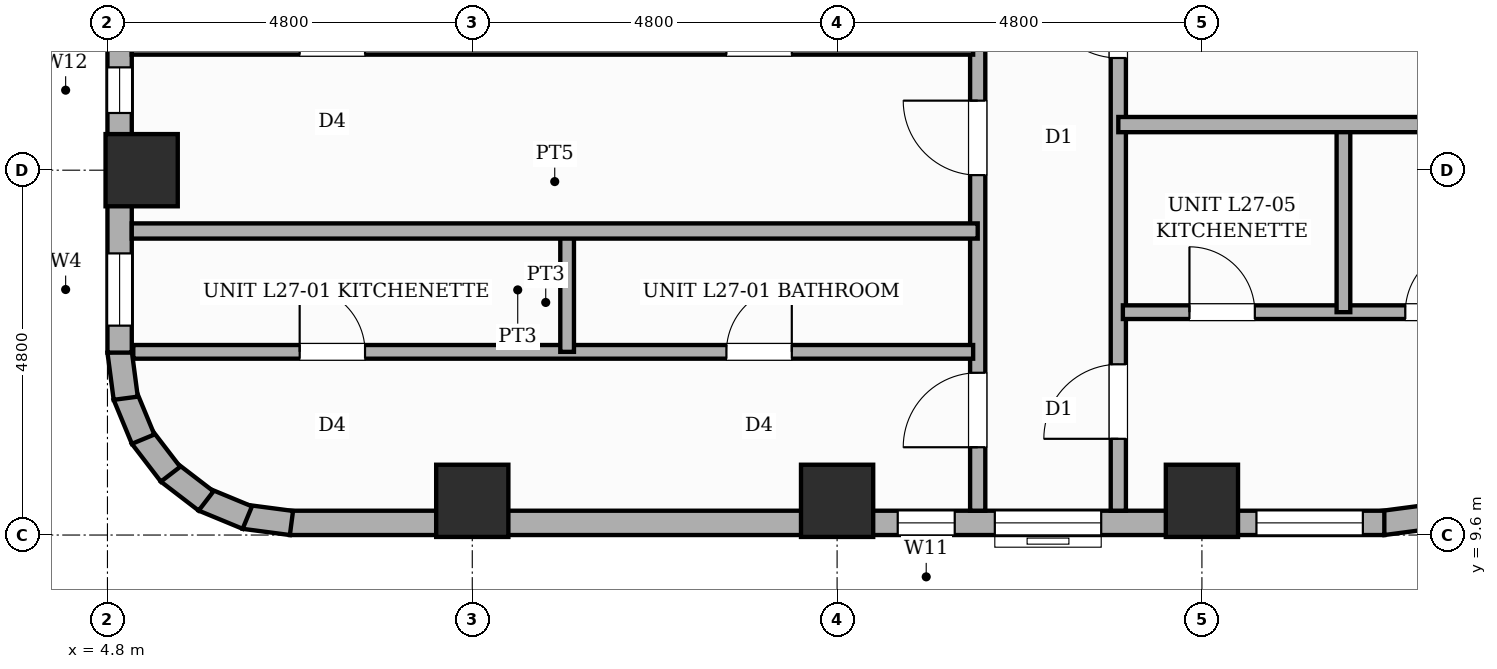
"""IFC4 building model, lengths in metres.
Left out: names, types, materials, properties, quantities, classifications, styles, units other than length and angle.
Written with IfcOpenShell. Run it as: python <this file> out.ifc"""

import sys

from ifc_helpers import new_model, si_unit, direction, frame, frame_2d, origin, origin_2d, place, context, subcontext, project, spatial, rectangle, extrude, element, fill, save


model = new_model("IFC4")
c1 = context("Model", 3, precision=1e-05, world=origin(), true_north=direction((0.0, 1.0)))
c2 = subcontext(c1, "Body", "Model", "MODEL_VIEW")
j1 = project(units=[si_unit("LENGTHUNIT", "METRE"), si_unit("PLANEANGLEUNIT", "RADIAN")], contexts=[c1])
p1 = place(None, origin())
s1 = spatial("IfcSite", under=j1, at=p1, CompositionType="ELEMENT")
p2 = place(p1, origin())
s2 = spatial("IfcBuilding", under=s1, at=p2, CompositionType="ELEMENT")
p3 = place(p2, frame((0.0, 0.0, 107.2)))
s3 = spatial("IfcBuildingStorey", under=s2, at=p3, CompositionType="ELEMENT", Elevation=107.2)
for number, where, z_axis, x_axis in (
    (1, (5.25, 14.4, 0.0), (0.0, 0.0, 1.0), (1.0, 0.0, 0.0)),
    (2, (9.6, 10.05, 0.0), (0.0, 0.0, 1.0), (1.0, 0.0, 0.0)),
    (3, (14.4, 10.05, 0.0), (0.0, 0.0, 1.0), (1.0, 0.0, 0.0)),
    (4, (19.2, 10.05, 0.0), (0.0, 0.0, 1.0), (1.0, 0.0, 0.0)),
):
    element("IfcColumn", number, at=place(p3, frame(where, z_axis=z_axis, x_axis=x_axis)), inside=s3, PredefinedType="COLUMN", context=c2, shape_type="SweptSolid", body=[
        extrude(rectangle(XDim=0.95, YDim=0.95, at=origin_2d()), origin(), (0.0, 0.0, 1.0), 3.6),
    ])
p4 = place(p3, frame((22.2, 9.84, 0.0), z_axis=(0.0, 0.0, 1.0), x_axis=(-0.9914410257, -0.130555323746, 0.0)))
e5 = element("IfcWall", 5, at=p4, inside=s3, PredefinedType="STANDARD", context=c2, shape_type="SweptSolid", body=[
    extrude(rectangle(XDim=0.626, YDim=0.32, at=frame_2d((0.313, 0.0))), origin(), (0.0, 0.0, 1.0), 3.36),
])
p5 = place(p3, frame((21.6, 9.76, 0.0), z_axis=(0.0, 0.0, 1.0), x_axis=(-1.0, 0.0, 0.0)))
e6 = element("IfcWall", 6, at=p5, inside=s3, PredefinedType="STANDARD", context=c2, shape_type="SweptSolid", body=[
    extrude(rectangle(XDim=14.4, YDim=0.32, at=frame_2d((7.2, 0.0))), origin(), (0.0, 0.0, 1.0), 2.54),
])
p6 = place(p5, frame((5.653, 0.0, 0.45)))
e7 = element("IfcOpeningElement", 7, at=p6, cuts=e6, PredefinedType="OPENING", context=c2, shape_type="SweptSolid", body=[
    extrude(rectangle(XDim=0.75, YDim=1.8, at=frame_2d((0.375, 0.9))), frame((0.0, 0.17, 0.0), z_axis=(0.0, -1.0, 0.0), x_axis=(1.0, 0.0, 0.0)), (0.0, 0.0, 1.0), 0.34),
])
p7 = place(p5, frame((0.282, 0.0, 0.65)))
e8 = element("IfcOpeningElement", 8, at=p7, cuts=e6, PredefinedType="OPENING", context=c2, shape_type="SweptSolid", body=[
    extrude(rectangle(XDim=1.4, YDim=1.1, at=frame_2d((0.7, 0.55))), frame((0.0, 0.17, 0.0), z_axis=(0.0, -1.0, 0.0), x_axis=(1.0, 0.0, 0.0)), (0.0, 0.0, 1.0), 0.34),
])
p8 = place(p5, frame((3.725, 0.0, 0.65)))
e9 = element("IfcOpeningElement", 9, at=p8, cuts=e6, PredefinedType="OPENING", context=c2, shape_type="SweptSolid", body=[
    extrude(rectangle(XDim=1.4, YDim=1.1, at=frame_2d((0.7, 0.55))), frame((0.0, 0.17, 0.0), z_axis=(0.0, -1.0, 0.0), x_axis=(1.0, 0.0, 0.0)), (0.0, 0.0, 1.0), 0.34),
])
p9 = place(p3, frame((7.221, 9.759, 0.0), z_axis=(0.0, 0.0, 1.0), x_axis=(-0.991447664465, 0.130504898859, 0.0)))
e10 = element("IfcWall", 10, at=p9, inside=s3, PredefinedType="STANDARD", context=c2, shape_type="SweptSolid", body=[
    extrude(rectangle(XDim=0.627, YDim=0.32, at=frame_2d((0.313, 0.0))), origin(), (0.0, 0.0, 1.0), 3.36),
])
p10 = place(p3, frame((6.64, 9.83, 0.0), z_axis=(0.0, 0.0, 1.0), x_axis=(-0.923836271867, 0.382787856107, 0.0)))
e11 = element("IfcWall", 11, at=p10, inside=s3, PredefinedType="STANDARD", context=c2, shape_type="SweptSolid", body=[
    extrude(rectangle(XDim=0.626, YDim=0.32, at=frame_2d((0.313, 0.0))), origin(), (0.0, 0.0, 1.0), 3.36),
])
p11 = place(p3, frame((6.097, 10.048, 0.0), z_axis=(0.0, 0.0, 1.0), x_axis=(-0.793405610854, 0.608693302629, 0.0)))
e12 = element("IfcWall", 12, at=p11, inside=s3, PredefinedType="STANDARD", context=c2, shape_type="SweptSolid", body=[
    extrude(rectangle(XDim=0.626, YDim=0.32, at=frame_2d((0.313, 0.0))), origin(), (0.0, 0.0, 1.0), 3.36),
])
p12 = place(p3, frame((5.63, 10.4, 0.0), z_axis=(0.0, 0.0, 1.0), x_axis=(-0.608938521285, 0.7932174212, 0.0)))
e13 = element("IfcWall", 13, at=p12, inside=s3, PredefinedType="STANDARD", context=c2, shape_type="SweptSolid", body=[
    extrude(rectangle(XDim=0.627, YDim=0.32, at=frame_2d((0.313, 0.0))), origin(), (0.0, 0.0, 1.0), 3.36),
])
p13 = place(p3, frame((5.269, 10.861, 0.0), z_axis=(0.0, 0.0, 1.0), x_axis=(-0.382650053678, 0.92389335771, 0.0)))
e14 = element("IfcWall", 14, at=p13, inside=s3, PredefinedType="STANDARD", context=c2, shape_type="SweptSolid", body=[
    extrude(rectangle(XDim=0.626, YDim=0.32, at=frame_2d((0.313, 0.0))), origin(), (0.0, 0.0, 1.0), 3.36),
])
p14 = place(p3, frame((5.04, 11.4, 0.0), z_axis=(0.0, 0.0, 1.0), x_axis=(-0.130504898859, 0.991447664465, 0.0)))
e15 = element("IfcWall", 15, at=p14, inside=s3, PredefinedType="STANDARD", context=c2, shape_type="SweptSolid", body=[
    extrude(rectangle(XDim=0.627, YDim=0.32, at=frame_2d((0.313, 0.0))), origin(), (0.0, 0.0, 1.0), 3.36),
])
p15 = place(p3, frame((4.96, 12.0, 0.0), z_axis=(0.0, 0.0, 1.0), x_axis=(0.0, 1.0, 0.0)))
e16 = element("IfcWall", 16, at=p15, inside=s3, PredefinedType="STANDARD", context=c2, shape_type="SweptSolid", body=[
    extrude(rectangle(XDim=33.6, YDim=0.32, at=frame_2d((16.8, 0.0))), origin(), (0.0, 0.0, 1.0), 2.54),
])
p16 = place(p15, frame((3.153, 0.0, 0.45)))
e17 = element("IfcOpeningElement", 17, at=p16, cuts=e16, PredefinedType="OPENING", context=c2, shape_type="SweptSolid", body=[
    extrude(rectangle(XDim=0.6, YDim=1.8, at=frame_2d((0.3, 0.9))), frame((0.0, 0.17, 0.0), z_axis=(0.0, -1.0, 0.0), x_axis=(1.0, 0.0, 0.0)), (0.0, 0.0, 1.0), 0.34),
])
p17 = place(p15, frame((5.853, 0.0, 0.45)))
e18 = element("IfcOpeningElement", 18, at=p17, cuts=e16, PredefinedType="OPENING", context=c2, shape_type="SweptSolid", body=[
    extrude(rectangle(XDim=0.6, YDim=1.8, at=frame_2d((0.3, 0.9))), frame((0.0, 0.17, 0.0), z_axis=(0.0, -1.0, 0.0), x_axis=(1.0, 0.0, 0.0)), (0.0, 0.0, 1.0), 0.34),
])
p18 = place(p15, frame((9.853, 0.0, 0.65)))
e19 = element("IfcOpeningElement", 19, at=p18, cuts=e16, PredefinedType="OPENING", context=c2, shape_type="SweptSolid", body=[
    extrude(rectangle(XDim=1.4, YDim=1.1, at=frame_2d((0.7, 0.55))), frame((0.0, 0.17, 0.0), z_axis=(0.0, -1.0, 0.0), x_axis=(1.0, 0.0, 0.0)), (0.0, 0.0, 1.0), 0.34),
])
p19 = place(p15, frame((0.355, 0.0, 0.45)))
e20 = element("IfcOpeningElement", 20, at=p19, cuts=e16, PredefinedType="OPENING", context=c2, shape_type="SweptSolid", body=[
    extrude(rectangle(XDim=0.95, YDim=1.8, at=frame_2d((0.475, 0.9))), frame((0.0, 0.17, 0.0), z_axis=(0.0, -1.0, 0.0), x_axis=(1.0, 0.0, 0.0)), (0.0, 0.0, 1.0), 0.34),
])
p20 = place(p15, frame((4.33, 0.0, 0.45)))
e21 = element("IfcOpeningElement", 21, at=p20, cuts=e16, PredefinedType="OPENING", context=c2, shape_type="SweptSolid", body=[
    extrude(rectangle(XDim=0.95, YDim=1.8, at=frame_2d((0.475, 0.9))), frame((0.0, 0.17, 0.0), z_axis=(0.0, -1.0, 0.0), x_axis=(1.0, 0.0, 0.0)), (0.0, 0.0, 1.0), 0.34),
])
p21 = place(p15, frame((8.33, 0.0, 0.45)))
e22 = element("IfcOpeningElement", 22, at=p21, cuts=e16, PredefinedType="OPENING", context=c2, shape_type="SweptSolid", body=[
    extrude(rectangle(XDim=0.95, YDim=1.8, at=frame_2d((0.475, 0.9))), frame((0.0, 0.17, 0.0), z_axis=(0.0, -1.0, 0.0), x_axis=(1.0, 0.0, 0.0)), (0.0, 0.0, 1.0), 0.34),
])
p22 = place(p15, frame((12.732, 0.0, 0.45)))
e23 = element("IfcOpeningElement", 23, at=p22, cuts=e16, PredefinedType="OPENING", context=c2, shape_type="SweptSolid", body=[
    extrude(rectangle(XDim=0.75, YDim=1.8, at=frame_2d((0.375, 0.9))), frame((0.0, 0.17, 0.0), z_axis=(0.0, -1.0, 0.0), x_axis=(1.0, 0.0, 0.0)), (0.0, 0.0, 1.0), 0.34),
])
p23 = place(p15, frame((14.558, 0.0, 0.65)))
e24 = element("IfcOpeningElement", 24, at=p23, cuts=e16, PredefinedType="OPENING", context=c2, shape_type="SweptSolid", body=[
    extrude(rectangle(XDim=1.4, YDim=1.1, at=frame_2d((0.7, 0.55))), frame((0.0, 0.17, 0.0), z_axis=(0.0, -1.0, 0.0), x_axis=(1.0, 0.0, 0.0)), (0.0, 0.0, 1.0), 0.34),
])
p24 = place(p3, frame((16.25, 9.92, 0.0), z_axis=(0.0, 0.0, 1.0), x_axis=(0.0, 1.0, 0.0)))
e25 = element("IfcWall", 25, at=p24, inside=s3, PredefinedType="PARTITIONING", context=c2, shape_type="SweptSolid", body=[
    extrude(rectangle(XDim=15.83, YDim=0.2, at=frame_2d((7.915, 0.0))), origin(), (0.0, 0.0, 1.0), 3.36),
])
p25 = place(p24, frame((0.835, 0.0, 0.0)))
e26 = element("IfcOpeningElement", 26, at=p25, cuts=e25, PredefinedType="OPENING", context=c2, shape_type="SweptSolid", body=[
    extrude(rectangle(XDim=0.98, YDim=2.18, at=frame_2d((0.49, 1.09))), frame((0.0, 0.11, 0.0), z_axis=(0.0, -1.0, 0.0), x_axis=(1.0, 0.0, 0.0)), (0.0, 0.0, 1.0), 0.22),
])
p26 = place(p24, frame((4.415, 0.0, 0.0)))
e27 = element("IfcOpeningElement", 27, at=p26, cuts=e25, PredefinedType="OPENING", context=c2, shape_type="SweptSolid", body=[
    extrude(rectangle(XDim=0.98, YDim=2.18, at=frame_2d((0.49, 1.09))), frame((0.0, 0.11, 0.0), z_axis=(0.0, -1.0, 0.0), x_axis=(1.0, 0.0, 0.0)), (0.0, 0.0, 1.0), 0.22),
])
p27 = place(p24, frame((8.415, 0.0, 0.0)))
e28 = element("IfcOpeningElement", 28, at=p27, cuts=e25, PredefinedType="OPENING", context=c2, shape_type="SweptSolid", body=[
    extrude(rectangle(XDim=0.98, YDim=2.18, at=frame_2d((0.49, 1.09))), frame((0.0, 0.11, 0.0), z_axis=(0.0, -1.0, 0.0), x_axis=(1.0, 0.0, 0.0)), (0.0, 0.0, 1.0), 0.22),
])
p28 = place(p24, frame((12.28, 0.0, 0.0)))
e29 = element("IfcOpeningElement", 29, at=p28, cuts=e25, PredefinedType="OPENING", context=c2, shape_type="SweptSolid", body=[
    extrude(rectangle(XDim=0.98, YDim=2.18, at=frame_2d((0.49, 1.09))), frame((0.0, 0.11, 0.0), z_axis=(0.0, -1.0, 0.0), x_axis=(1.0, 0.0, 0.0)), (0.0, 0.0, 1.0), 0.22),
])
p29 = place(p3, frame((18.1, 9.92, 0.0), z_axis=(0.0, 0.0, 1.0), x_axis=(0.0, 1.0, 0.0)))
e30 = element("IfcWall", 30, at=p29, inside=s3, PredefinedType="PARTITIONING", context=c2, shape_type="SweptSolid", body=[
    extrude(rectangle(XDim=15.83, YDim=0.2, at=frame_2d((7.915, 0.0))), origin(), (0.0, 0.0, 1.0), 3.36),
])
p30 = place(p29, frame((0.946, 0.0, 0.0)))
e31 = element("IfcOpeningElement", 31, at=p30, cuts=e30, PredefinedType="OPENING", context=c2, shape_type="SweptSolid", body=[
    extrude(rectangle(XDim=0.98, YDim=2.18, at=frame_2d((0.49, 1.09))), frame((0.0, 0.11, 0.0), z_axis=(0.0, -1.0, 0.0), x_axis=(1.0, 0.0, 0.0)), (0.0, 0.0, 1.0), 0.22),
])
p31 = place(p29, frame((5.956, 0.0, 0.0)))
e32 = element("IfcOpeningElement", 32, at=p31, cuts=e30, PredefinedType="OPENING", context=c2, shape_type="SweptSolid", body=[
    extrude(rectangle(XDim=0.98, YDim=2.18, at=frame_2d((0.49, 1.09))), frame((0.0, 0.11, 0.0), z_axis=(0.0, -1.0, 0.0), x_axis=(1.0, 0.0, 0.0)), (0.0, 0.0, 1.0), 0.22),
])
p32 = place(p29, frame((11.356, 0.0, 0.0)))
e33 = element("IfcOpeningElement", 33, at=p32, cuts=e30, PredefinedType="OPENING", context=c2, shape_type="SweptSolid", body=[
    extrude(rectangle(XDim=0.98, YDim=2.18, at=frame_2d((0.49, 1.09))), frame((0.0, 0.11, 0.0), z_axis=(0.0, -1.0, 0.0), x_axis=(1.0, 0.0, 0.0)), (0.0, 0.0, 1.0), 0.22),
])
p33 = place(p3, frame((5.14, 12.01, 0.0), z_axis=(0.0, 0.0, 1.0), x_axis=(1.0, 0.0, 0.0)))
e34 = element("IfcWall", 34, at=p33, inside=s3, PredefinedType="PLUMBINGWALL", context=c2, shape_type="SweptSolid", body=[
    extrude(rectangle(XDim=11.05, YDim=0.18, at=frame_2d((5.525, 0.0))), origin(), (0.0, 0.0, 1.0), 3.36),
])
p34 = place(p33, frame((2.189, 0.0, 0.0)))
e35 = element("IfcOpeningElement", 35, at=p34, cuts=e34, PredefinedType="OPENING", context=c2, shape_type="SweptSolid", body=[
    extrude(rectangle(XDim=0.86, YDim=2.1, at=frame_2d((0.43, 1.05))), frame((0.0, 0.1, 0.0), z_axis=(0.0, -1.0, 0.0), x_axis=(1.0, 0.0, 0.0)), (0.0, 0.0, 1.0), 0.2),
])
p35 = place(p33, frame((7.804, 0.0, 0.0)))
e36 = element("IfcOpeningElement", 36, at=p35, cuts=e34, PredefinedType="OPENING", context=c2, shape_type="SweptSolid", body=[
    extrude(rectangle(XDim=0.86, YDim=2.1, at=frame_2d((0.43, 1.05))), frame((0.0, 0.1, 0.0), z_axis=(0.0, -1.0, 0.0), x_axis=(1.0, 0.0, 0.0)), (0.0, 0.0, 1.0), 0.2),
])
p36 = place(p3, frame((10.848, 12.01, 0.0), z_axis=(0.0, 0.0, 1.0), x_axis=(0.0, 1.0, 0.0)))
e37 = element("IfcWall", 37, at=p36, inside=s3, PredefinedType="PLUMBINGWALL", context=c2, shape_type="SweptSolid", body=[
    extrude(rectangle(XDim=1.63, YDim=0.18, at=frame_2d((0.815, 0.0))), origin(), (0.0, 0.0, 1.0), 3.36),
])
p37 = place(p3, frame((5.12, 13.6, 0.0), z_axis=(0.0, 0.0, 1.0), x_axis=(1.0, 0.0, 0.0)))
e38 = element("IfcWall", 38, at=p37, inside=s3, PredefinedType="SOLIDWALL", context=c2, shape_type="SweptSolid", body=[
    extrude(rectangle(XDim=11.13, YDim=0.2, at=frame_2d((5.565, 0.0))), origin(), (0.0, 0.0, 1.0), 3.36),
])
p38 = place(p3, frame((5.12, 16.01, 0.0), z_axis=(0.0, 0.0, 1.0), x_axis=(1.0, 0.0, 0.0)))
e39 = element("IfcWall", 39, at=p38, inside=s3, PredefinedType="PLUMBINGWALL", context=c2, shape_type="SweptSolid", body=[
    extrude(rectangle(XDim=11.07, YDim=0.18, at=frame_2d((5.535, 0.0))), origin(), (0.0, 0.0, 1.0), 3.36),
])
p39 = place(p38, frame((2.209, 0.0, 0.0)))
e40 = element("IfcOpeningElement", 40, at=p39, cuts=e39, PredefinedType="OPENING", context=c2, shape_type="SweptSolid", body=[
    extrude(rectangle(XDim=0.86, YDim=2.1, at=frame_2d((0.43, 1.05))), frame((0.0, 0.1, 0.0), z_axis=(0.0, -1.0, 0.0), x_axis=(1.0, 0.0, 0.0)), (0.0, 0.0, 1.0), 0.2),
])
p40 = place(p38, frame((7.824, 0.0, 0.0)))
e41 = element("IfcOpeningElement", 41, at=p40, cuts=e39, PredefinedType="OPENING", context=c2, shape_type="SweptSolid", body=[
    extrude(rectangle(XDim=0.86, YDim=2.1, at=frame_2d((0.43, 1.05))), frame((0.0, 0.1, 0.0), z_axis=(0.0, -1.0, 0.0), x_axis=(1.0, 0.0, 0.0)), (0.0, 0.0, 1.0), 0.2),
])
p41 = place(p3, frame((18.16, 12.532, 0.0), z_axis=(0.0, 0.0, 1.0), x_axis=(1.0, 0.0, 0.0)))
e42 = element("IfcWall", 42, at=p41, inside=s3, PredefinedType="PLUMBINGWALL", context=c2, shape_type="SweptSolid", body=[
    extrude(rectangle(XDim=5.52, YDim=0.18, at=frame_2d((2.76, 0.0))), origin(), (0.0, 0.0, 1.0), 3.36),
])
p42 = place(p41, frame((0.876, 0.0, 0.0)))
e43 = element("IfcOpeningElement", 43, at=p42, cuts=e42, PredefinedType="OPENING", context=c2, shape_type="SweptSolid", body=[
    extrude(rectangle(XDim=0.86, YDim=2.1, at=frame_2d((0.43, 1.05))), frame((0.0, 0.1, 0.0), z_axis=(0.0, -1.0, 0.0), x_axis=(1.0, 0.0, 0.0)), (0.0, 0.0, 1.0), 0.2),
])
p43 = place(p41, frame((3.716, 0.0, 0.0)))
e44 = element("IfcOpeningElement", 44, at=p43, cuts=e42, PredefinedType="OPENING", context=c2, shape_type="SweptSolid", body=[
    extrude(rectangle(XDim=0.86, YDim=2.1, at=frame_2d((0.43, 1.05))), frame((0.0, 0.1, 0.0), z_axis=(0.0, -1.0, 0.0), x_axis=(1.0, 0.0, 0.0)), (0.0, 0.0, 1.0), 0.2),
])
p44 = place(p3, frame((21.062, 12.532, 0.0), z_axis=(0.0, 0.0, 1.0), x_axis=(0.0, 1.0, 0.0)))
e45 = element("IfcWall", 45, at=p44, inside=s3, PredefinedType="PLUMBINGWALL", context=c2, shape_type="SweptSolid", body=[
    extrude(rectangle(XDim=2.508, YDim=0.18, at=frame_2d((1.254, 0.0))), origin(), (0.0, 0.0, 1.0), 3.36),
])
p45 = place(p3, frame((18.1, 15.0, 0.0), z_axis=(0.0, 0.0, 1.0), x_axis=(1.0, 0.0, 0.0)))
e46 = element("IfcWall", 46, at=p45, inside=s3, PredefinedType="SOLIDWALL", context=c2, shape_type="SweptSolid", body=[
    extrude(rectangle(XDim=5.58, YDim=0.2, at=frame_2d((2.79, 0.0))), origin(), (0.0, 0.0, 1.0), 3.36),
])
p46 = place(p6, origin())
e47 = element("IfcWindow", 47, at=p46, inside=s3, PartitioningType="SINGLE_PANEL", PredefinedType="WINDOW", context=c2, shape_type="SweptSolid", body=[
    extrude(rectangle(XDim=0.75, YDim=1.8, at=frame_2d((0.375, 0.9))), frame((0.0, 0.03, 0.0), z_axis=(0.0, -1.0, 0.0), x_axis=(1.0, 0.0, 0.0)), (0.0, 0.0, 1.0), 0.06),
])
fill(e7, e47)
p47 = place(p7, origin())
e48 = element("IfcWindow", 48, at=p47, inside=s3, PartitioningType="SINGLE_PANEL", PredefinedType="WINDOW", context=c2, shape_type="SweptSolid", body=[
    extrude(rectangle(XDim=1.4, YDim=1.1, at=frame_2d((0.7, 0.55))), frame((0.0, 0.03, 0.0), z_axis=(0.0, -1.0, 0.0), x_axis=(1.0, 0.0, 0.0)), (0.0, 0.0, 1.0), 0.06),
])
fill(e8, e48)
p48 = place(p8, origin())
e49 = element("IfcWindow", 49, at=p48, inside=s3, PartitioningType="SINGLE_PANEL", PredefinedType="WINDOW", context=c2, shape_type="SweptSolid", body=[
    extrude(rectangle(XDim=1.4, YDim=1.1, at=frame_2d((0.7, 0.55))), frame((0.0, 0.03, 0.0), z_axis=(0.0, -1.0, 0.0), x_axis=(1.0, 0.0, 0.0)), (0.0, 0.0, 1.0), 0.06),
])
fill(e9, e49)
p49 = place(p16, origin())
e50 = element("IfcWindow", 50, at=p49, inside=s3, PartitioningType="SINGLE_PANEL", PredefinedType="WINDOW", context=c2, shape_type="SweptSolid", body=[
    extrude(rectangle(XDim=0.6, YDim=1.8, at=frame_2d((0.3, 0.9))), frame((0.0, 0.03, 0.0), z_axis=(0.0, -1.0, 0.0), x_axis=(1.0, 0.0, 0.0)), (0.0, 0.0, 1.0), 0.06),
])
fill(e17, e50)
p50 = place(p19, origin())
e51 = element("IfcWindow", 51, at=p50, inside=s3, PartitioningType="SINGLE_PANEL", PredefinedType="WINDOW", context=c2, shape_type="SweptSolid", body=[
    extrude(rectangle(XDim=0.95, YDim=1.8, at=frame_2d((0.475, 0.9))), frame((0.0, 0.03, 0.0), z_axis=(0.0, -1.0, 0.0), x_axis=(1.0, 0.0, 0.0)), (0.0, 0.0, 1.0), 0.06),
])
fill(e20, e51)
p51 = place(p25, origin())
e52 = element("IfcDoor", 52, at=p51, inside=s3, OperationType="SINGLE_SWING_LEFT", PredefinedType="DOOR", context=c2, shape_type="SweptSolid", body=[
    extrude(rectangle(XDim=0.98, YDim=2.18, at=frame_2d((0.49, 1.09))), frame((0.0, 0.025, 0.0), z_axis=(0.0, -1.0, 0.0), x_axis=(1.0, 0.0, 0.0)), (0.0, 0.0, 1.0), 0.05),
])
fill(e26, e52)
p52 = place(p34, origin())
e53 = element("IfcDoor", 53, at=p52, inside=s3, OperationType="SINGLE_SWING_LEFT", PredefinedType="DOOR", context=c2, shape_type="SweptSolid", body=[
    extrude(rectangle(XDim=0.86, YDim=2.1, at=frame_2d((0.43, 1.05))), frame((0.0, 0.025, 0.0), z_axis=(0.0, -1.0, 0.0), x_axis=(1.0, 0.0, 0.0)), (0.0, 0.0, 1.0), 0.05),
])
fill(e35, e53)
p53 = place(p35, origin())
e54 = element("IfcDoor", 54, at=p53, inside=s3, OperationType="SINGLE_SWING_RIGHT", PredefinedType="DOOR", context=c2, shape_type="SweptSolid", body=[
    extrude(rectangle(XDim=0.86, YDim=2.1, at=frame_2d((0.43, 1.05))), frame((0.0, 0.025, 0.0), z_axis=(0.0, -1.0, 0.0), x_axis=(1.0, 0.0, 0.0)), (0.0, 0.0, 1.0), 0.05),
])
fill(e36, e54)
p54 = place(p26, origin())
e55 = element("IfcDoor", 55, at=p54, inside=s3, OperationType="SINGLE_SWING_RIGHT", PredefinedType="DOOR", context=c2, shape_type="SweptSolid", body=[
    extrude(rectangle(XDim=0.98, YDim=2.18, at=frame_2d((0.49, 1.09))), frame((0.0, 0.025, 0.0), z_axis=(0.0, -1.0, 0.0), x_axis=(1.0, 0.0, 0.0)), (0.0, 0.0, 1.0), 0.05),
])
fill(e27, e55)
p55 = place(p30, origin())
e56 = element("IfcDoor", 56, at=p55, inside=s3, OperationType="SINGLE_SWING_LEFT", PredefinedType="DOOR", context=c2, shape_type="SweptSolid", body=[
    extrude(rectangle(XDim=0.98, YDim=2.18, at=frame_2d((0.49, 1.09))), frame((0.0, 0.025, 0.0), z_axis=(0.0, -1.0, 0.0), x_axis=(1.0, 0.0, 0.0)), (0.0, 0.0, 1.0), 0.05),
])
fill(e31, e56)
p56 = place(p42, origin())
e57 = element("IfcDoor", 57, at=p56, inside=s3, OperationType="SINGLE_SWING_LEFT", PredefinedType="DOOR", context=c2, shape_type="SweptSolid", body=[
    extrude(rectangle(XDim=0.86, YDim=2.1, at=frame_2d((0.43, 1.05))), frame((0.0, 0.025, 0.0), z_axis=(0.0, -1.0, 0.0), x_axis=(1.0, 0.0, 0.0)), (0.0, 0.0, 1.0), 0.05),
])
fill(e43, e57)
p57 = place(p43, origin())
e58 = element("IfcDoor", 58, at=p57, inside=s3, OperationType="SINGLE_SWING_RIGHT", PredefinedType="DOOR", context=c2, shape_type="SweptSolid", body=[
    extrude(rectangle(XDim=0.86, YDim=2.1, at=frame_2d((0.43, 1.05))), frame((0.0, 0.025, 0.0), z_axis=(0.0, -1.0, 0.0), x_axis=(1.0, 0.0, 0.0)), (0.0, 0.0, 1.0), 0.05),
])
fill(e44, e58)
p58 = place(p31, origin())
e59 = element("IfcDoor", 59, at=p58, inside=s3, OperationType="SINGLE_SWING_RIGHT", PredefinedType="DOOR", context=c2, shape_type="SweptSolid", body=[
    extrude(rectangle(XDim=0.98, YDim=2.18, at=frame_2d((0.49, 1.09))), frame((0.0, 0.025, 0.0), z_axis=(0.0, -1.0, 0.0), x_axis=(1.0, 0.0, 0.0)), (0.0, 0.0, 1.0), 0.05),
])
fill(e32, e59)
save(model, sys.argv[1])
